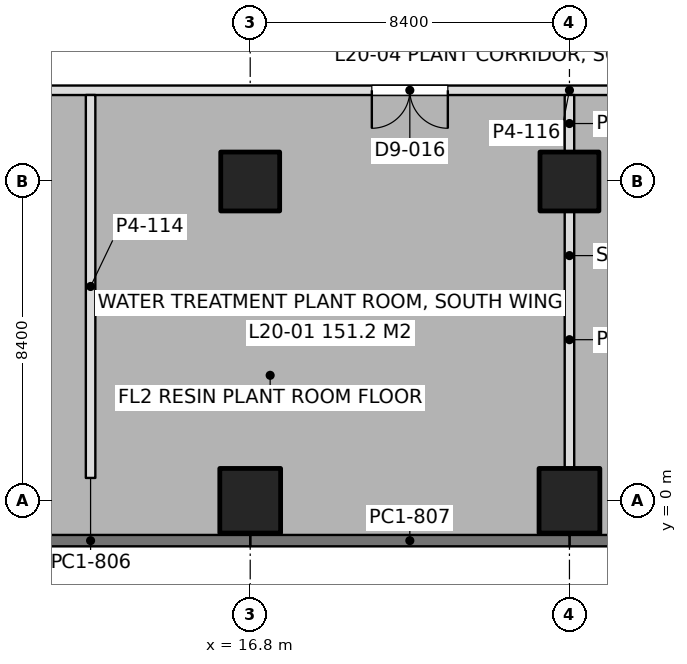
"""IFC4 building model, lengths in metres.
Left out: names, types, materials, properties, quantities, classifications, styles, units other than length and angle.
Written with IfcOpenShell. Run it as: python <this file> out.ifc"""

import sys

from ifc_helpers import new_model, si_unit, direction, frame, frame_2d, origin, origin_2d, place, context, subcontext, project, spatial, rectangle, extrude, element, fill, save


model = new_model("IFC4")
c1 = context("Model", 3, precision=1e-05, world=origin(), true_north=direction((0.0, 1.0)))
c2 = subcontext(c1, "Body", "Model", "MODEL_VIEW")
j1 = project(units=[si_unit("LENGTHUNIT", "METRE"), si_unit("PLANEANGLEUNIT", "RADIAN")], contexts=[c1])
p1 = place(None, origin())
s1 = spatial("IfcSite", under=j1, at=p1, CompositionType="ELEMENT")
p2 = place(p1, origin())
s2 = spatial("IfcBuilding", under=s1, at=p2, CompositionType="ELEMENT")
p3 = place(p2, frame((0.0, 0.0, 90.9)))
s3 = spatial("IfcBuildingStorey", under=s2, at=p3, CompositionType="ELEMENT", Elevation=90.9)
p4 = place(p3, frame((16.8, 0.0, 0.0), z_axis=(0.0, 0.0, 1.0), x_axis=(1.0, 0.0, 0.0)))
e1 = element("IfcColumn", 1, at=p4, inside=s3, PredefinedType="COLUMN", context=c2, shape_type="SweptSolid", body=[
    extrude(rectangle(XDim=1.6, YDim=1.7, at=origin_2d()), origin(), (0.0, 0.0, 1.0), 5.24),
])
p5 = place(p3, frame((16.8, 8.4, 0.0), z_axis=(0.0, 0.0, 1.0), x_axis=(1.0, 0.0, 0.0)))
e2 = element("IfcColumn", 2, at=p5, inside=s3, PredefinedType="COLUMN", context=c2, shape_type="SweptSolid", body=[
    extrude(rectangle(XDim=1.55, YDim=1.55, at=origin_2d()), origin(), (0.0, 0.0, 1.0), 5.4),
])
p6 = place(p3, frame((25.2, 0.0, 0.0), z_axis=(0.0, 0.0, 1.0), x_axis=(1.0, 0.0, 0.0)))
e3 = element("IfcColumn", 3, at=p6, inside=s3, PredefinedType="COLUMN", context=c2, shape_type="SweptSolid", body=[
    extrude(rectangle(XDim=1.6, YDim=1.7, at=origin_2d()), origin(), (0.0, 0.0, 1.0), 5.24),
])
p7 = place(p3, frame((25.2, 8.4, 0.0), z_axis=(0.0, 0.0, 1.0), x_axis=(1.0, 0.0, 0.0)))
e4 = element("IfcColumn", 4, at=p7, inside=s3, PredefinedType="COLUMN", context=c2, shape_type="SweptSolid", body=[
    extrude(rectangle(XDim=1.55, YDim=1.55, at=origin_2d()), origin(), (0.0, 0.0, 1.0), 5.4),
])
p8 = place(p3, frame((33.6, -1.05, 0.0), z_axis=(0.0, 0.0, 1.0), x_axis=(-1.0, 0.0, 0.0)))
e5 = element("IfcWall", 5, at=p8, inside=s3, PredefinedType="SOLIDWALL", context=c2, shape_type="SweptSolid", body=[
    extrude(rectangle(XDim=8.4, YDim=0.3, at=frame_2d((4.2, 0.0))), origin(), (0.0, 0.0, 1.0), 5.04),
])
p9 = place(p3, frame((25.2, -1.05, 0.0), z_axis=(0.0, 0.0, 1.0), x_axis=(-1.0, 0.0, 0.0)))
e6 = element("IfcWall", 6, at=p9, inside=s3, PredefinedType="SOLIDWALL", context=c2, shape_type="SweptSolid", body=[
    extrude(rectangle(XDim=8.4, YDim=0.3, at=frame_2d((4.2, 0.0))), origin(), (0.0, 0.0, 1.0), 5.04),
])
p10 = place(p3, frame((16.8, -1.05, 0.0), z_axis=(0.0, 0.0, 1.0), x_axis=(-1.0, 0.0, 0.0)))
e7 = element("IfcWall", 7, at=p10, inside=s3, PredefinedType="SOLIDWALL", context=c2, shape_type="SweptSolid", body=[
    extrude(rectangle(XDim=8.4, YDim=0.3, at=frame_2d((4.2, 0.0))), origin(), (0.0, 0.0, 1.0), 5.04),
])
p11 = place(p3, frame((1.2, 10.8, 0.0), z_axis=(0.0, 0.0, 1.0), x_axis=(1.0, 0.0, 0.0)))
e8 = element("IfcWall", 8, at=p11, inside=s3, PredefinedType="PARTITIONING", context=c2, shape_type="SweptSolid", body=[
    extrude(rectangle(XDim=48.0, YDim=0.25, at=frame_2d((24.0, 0.0))), origin(), (0.0, 0.0, 1.0), 4.64),
])
p12 = place(p11, frame((2.0, 0.0, 0.0)))
e9 = element("IfcOpeningElement", 9, at=p12, cuts=e8, PredefinedType="OPENING", context=c2, shape_type="SweptSolid", body=[
    extrude(rectangle(XDim=2.0, YDim=2.4, at=frame_2d((1.0, 1.2))), frame((0.0, 0.135, 0.0), z_axis=(0.0, -1.0, 0.0), x_axis=(1.0, 0.0, 0.0)), (0.0, 0.0, 1.0), 0.27),
])
p13 = place(p11, frame((18.8, 0.0, 0.0)))
e10 = element("IfcOpeningElement", 10, at=p13, cuts=e8, PredefinedType="OPENING", context=c2, shape_type="SweptSolid", body=[
    extrude(rectangle(XDim=2.0, YDim=2.4, at=frame_2d((1.0, 1.2))), frame((0.0, 0.135, 0.0), z_axis=(0.0, -1.0, 0.0), x_axis=(1.0, 0.0, 0.0)), (0.0, 0.0, 1.0), 0.27),
])
p14 = place(p11, frame((27.2, 0.0, 0.0)))
e11 = element("IfcOpeningElement", 11, at=p14, cuts=e8, PredefinedType="OPENING", context=c2, shape_type="SweptSolid", body=[
    extrude(rectangle(XDim=2.0, YDim=2.4, at=frame_2d((1.0, 1.2))), frame((0.0, 0.135, 0.0), z_axis=(0.0, -1.0, 0.0), x_axis=(1.0, 0.0, 0.0)), (0.0, 0.0, 1.0), 0.27),
])
p15 = place(p11, frame((44.0, 0.0, 0.0)))
e12 = element("IfcOpeningElement", 12, at=p15, cuts=e8, PredefinedType="OPENING", context=c2, shape_type="SweptSolid", body=[
    extrude(rectangle(XDim=2.0, YDim=2.4, at=frame_2d((1.0, 1.2))), frame((0.0, 0.135, 0.0), z_axis=(0.0, -1.0, 0.0), x_axis=(1.0, 0.0, 0.0)), (0.0, 0.0, 1.0), 0.27),
])
p16 = place(p3, frame((25.2, 0.849, 0.0), z_axis=(0.0, 0.0, 1.0), x_axis=(0.0, 1.0, 0.0)))
e13 = element("IfcWall", 13, at=p16, inside=s3, PredefinedType="PARTITIONING", context=c2, shape_type="SweptSolid", body=[
    extrude(rectangle(XDim=6.777, YDim=0.25, at=frame_2d((3.388, 0.0))), origin(), (0.0, 0.0, 1.0), 2.54),
])
p17 = place(p3, frame((25.2, 9.174, 0.0), z_axis=(0.0, 0.0, 1.0), x_axis=(0.0, 1.0, 0.0)))
e14 = element("IfcWall", 14, at=p17, inside=s3, PredefinedType="PARTITIONING", context=c2, shape_type="SweptSolid", body=[
    extrude(rectangle(XDim=1.502, YDim=0.25, at=frame_2d((0.751, 0.0))), origin(), (0.0, 0.0, 1.0), 4.64),
])
p18 = place(p3, frame((12.6, 0.6, 0.0), z_axis=(0.0, 0.0, 1.0), x_axis=(0.0, 1.0, 0.0)))
e15 = element("IfcWall", 15, at=p18, inside=s3, PredefinedType="PARTITIONING", context=c2, shape_type="SweptSolid", body=[
    extrude(rectangle(XDim=10.076, YDim=0.25, at=frame_2d((5.038, 0.0))), origin(), (0.0, 0.0, 1.0), 4.64),
])
p19 = place(p13, frame((2.0, 0.0, 0.0), z_axis=(0.0, 0.0, 1.0), x_axis=(-1.0, 0.0, 0.0)))
e16 = element("IfcDoor", 16, at=p19, inside=s3, OperationType="DOUBLE_DOOR_SINGLE_SWING", PredefinedType="DOOR", context=c2, shape_type="SweptSolid", body=[
    extrude(rectangle(XDim=2.0, YDim=2.4, at=frame_2d((1.0, 1.2))), frame((0.0, 0.025, 0.0), z_axis=(0.0, -1.0, 0.0), x_axis=(1.0, 0.0, 0.0)), (0.0, 0.0, 1.0), 0.05),
])
fill(e10, e16)
save(model, sys.argv[1])
